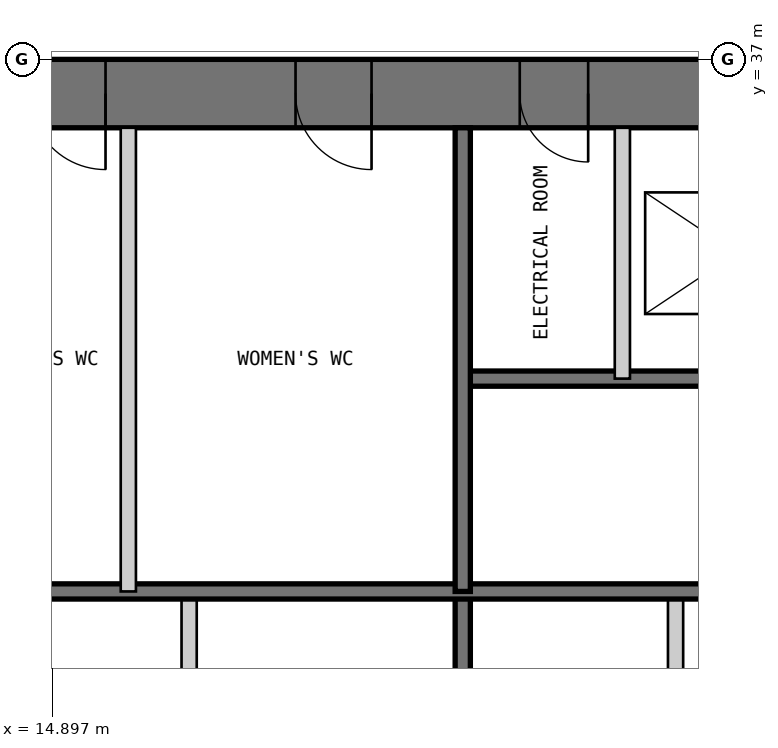
"""IFC4 building model, lengths in metres.
Left out: names, types, materials, properties, quantities, classifications, styles, units other than length and angle.
Written with IfcOpenShell. Run it as: python <this file> out.ifc"""

import sys

from ifc_helpers import new_model, si_unit, direction, frame, frame_2d, origin, place, context, subcontext, project, spatial, polyline, rectangle, outline, extrude, element, fill, save


model = new_model("IFC4")
c1 = context("Model", 3, precision=1e-05, world=origin(), true_north=direction((0.0, 1.0)))
c2 = subcontext(c1, "Body", "Model", "MODEL_VIEW")
j1 = project(units=[si_unit("LENGTHUNIT", "METRE"), si_unit("PLANEANGLEUNIT", "RADIAN")], contexts=[c1])
p1 = place(None, origin())
s1 = spatial("IfcSite", under=j1, at=p1, CompositionType="ELEMENT")
p2 = place(p1, origin())
s2 = spatial("IfcBuilding", under=s1, at=p2, CompositionType="ELEMENT")
p3 = place(p2, frame((0.0, 0.0, 259.4)))
s3 = spatial("IfcBuildingStorey", under=s2, at=p3, CompositionType="ELEMENT", Elevation=259.4)
p4 = place(p3, frame((37.0, 36.55, 0.0), z_axis=(0.0, 0.0, 1.0), x_axis=(-1.0, 0.0, 0.0)))
e1 = element("IfcWall", 1, at=p4, inside=s3, PredefinedType="SHEAR", context=c2, shape_type="SweptSolid", body=[
    extrude(outline(polyline([(0.0, -0.45), (24.0, -0.45), (23.1, 0.45), (0.9, 0.45), (0.0, -0.45)])), origin(), (0.0, 0.0, 1.0), 3.4),
])
p5 = place(p4, frame((4.9, 0.0, 0.0)))
e2 = element("IfcOpeningElement", 2, at=p5, cuts=e1, PredefinedType="OPENING", context=c2, shape_type="SweptSolid", body=[
    extrude(rectangle(XDim=1.0, YDim=2.2, at=frame_2d((0.5, 1.1))), frame((0.0, 0.46, 0.0), z_axis=(0.0, -1.0, 0.0), x_axis=(1.0, 0.0, 0.0)), (0.0, 0.0, 1.0), 0.92),
])
p6 = place(p4, frame((8.9, 0.0, 0.0)))
e3 = element("IfcOpeningElement", 3, at=p6, cuts=e1, PredefinedType="OPENING", context=c2, shape_type="SweptSolid", body=[
    extrude(rectangle(XDim=1.1, YDim=2.2, at=frame_2d((0.55, 1.1))), frame((0.0, 0.46, 0.0), z_axis=(0.0, -1.0, 0.0), x_axis=(1.0, 0.0, 0.0)), (0.0, 0.0, 1.0), 0.92),
])
p7 = place(p4, frame((15.05, 0.0, 0.0)))
e4 = element("IfcOpeningElement", 4, at=p7, cuts=e1, PredefinedType="OPENING", context=c2, shape_type="SweptSolid", body=[
    extrude(rectangle(XDim=0.9, YDim=2.2, at=frame_2d((0.45, 1.1))), frame((0.0, 0.46, 0.0), z_axis=(0.0, -1.0, 0.0), x_axis=(1.0, 0.0, 0.0)), (0.0, 0.0, 1.0), 0.92),
])
p8 = place(p4, frame((17.9, 0.0, 0.0)))
e5 = element("IfcOpeningElement", 5, at=p8, cuts=e1, PredefinedType="OPENING", context=c2, shape_type="SweptSolid", body=[
    extrude(rectangle(XDim=1.0, YDim=2.2, at=frame_2d((0.5, 1.1))), frame((0.0, 0.46, 0.0), z_axis=(0.0, -1.0, 0.0), x_axis=(1.0, 0.0, 0.0)), (0.0, 0.0, 1.0), 0.92),
])
p9 = place(p4, frame((21.4, 0.0, 0.0)))
e6 = element("IfcOpeningElement", 6, at=p9, cuts=e1, PredefinedType="OPENING", context=c2, shape_type="SweptSolid", body=[
    extrude(rectangle(XDim=1.0, YDim=2.2, at=frame_2d((0.5, 1.1))), frame((0.0, 0.46, 0.0), z_axis=(0.0, -1.0, 0.0), x_axis=(1.0, 0.0, 0.0)), (0.0, 0.0, 1.0), 0.92),
])
p10 = place(p3, frame((16.7, 13.9, 0.0), z_axis=(0.0, 0.0, 1.0), x_axis=(0.0, 1.0, 0.0)))
e7 = element("IfcWall", 7, at=p10, inside=s3, PredefinedType="PARTITIONING", context=c2, shape_type="SweptSolid", body=[
    extrude(rectangle(XDim=16.1, YDim=0.2, at=frame_2d((8.05, 0.0))), origin(), (0.0, 0.0, 1.0), 3.2),
])
p11 = place(p10, frame((6.15, 0.0, 0.0)))
e8 = element("IfcOpeningElement", 8, at=p11, cuts=e7, PredefinedType="OPENING", context=c2, shape_type="SweptSolid", body=[
    extrude(rectangle(XDim=0.9, YDim=2.2, at=frame_2d((0.45, 1.1))), frame((0.0, 0.11, 0.0), z_axis=(0.0, -1.0, 0.0), x_axis=(1.0, 0.0, 0.0)), (0.0, 0.0, 1.0), 0.22),
])
p12 = place(p10, frame((8.65, 0.0, 0.0)))
e9 = element("IfcOpeningElement", 9, at=p12, cuts=e7, PredefinedType="OPENING", context=c2, shape_type="SweptSolid", body=[
    extrude(rectangle(XDim=0.9, YDim=2.2, at=frame_2d((0.45, 1.1))), frame((0.0, 0.11, 0.0), z_axis=(0.0, -1.0, 0.0), x_axis=(1.0, 0.0, 0.0)), (0.0, 0.0, 1.0), 0.22),
])
p13 = place(p10, frame((12.8, 0.0, 0.0)))
e10 = element("IfcOpeningElement", 10, at=p13, cuts=e7, PredefinedType="OPENING", context=c2, shape_type="SweptSolid", body=[
    extrude(rectangle(XDim=0.9, YDim=2.2, at=frame_2d((0.45, 1.1))), frame((0.0, 0.11, 0.0), z_axis=(0.0, -1.0, 0.0), x_axis=(1.0, 0.0, 0.0)), (0.0, 0.0, 1.0), 0.22),
])
p14 = place(p3, frame((20.3, 13.9, 0.0), z_axis=(0.0, 0.0, 1.0), x_axis=(0.0, 1.0, 0.0)))
e11 = element("IfcWall", 11, at=p14, inside=s3, PredefinedType="SOLIDWALL", context=c2, shape_type="SweptSolid", body=[
    extrude(rectangle(XDim=16.1, YDim=0.2, at=frame_2d((8.05, 0.0))), origin(), (0.0, 0.0, 1.0), 3.2),
])
p15 = place(p14, frame((7.9, 0.0, 0.0)))
e12 = element("IfcOpeningElement", 12, at=p15, cuts=e11, PredefinedType="OPENING", context=c2, shape_type="SweptSolid", body=[
    extrude(rectangle(XDim=0.9, YDim=2.2, at=frame_2d((0.45, 1.1))), frame((0.0, 0.11, 0.0), z_axis=(0.0, -1.0, 0.0), x_axis=(1.0, 0.0, 0.0)), (0.0, 0.0, 1.0), 0.22),
])
p16 = place(p14, frame((12.9, 0.0, 0.0)))
e13 = element("IfcOpeningElement", 13, at=p16, cuts=e11, PredefinedType="OPENING", context=c2, shape_type="SweptSolid", body=[
    extrude(rectangle(XDim=0.9, YDim=2.2, at=frame_2d((0.45, 1.1))), frame((0.0, 0.11, 0.0), z_axis=(0.0, -1.0, 0.0), x_axis=(1.0, 0.0, 0.0)), (0.0, 0.0, 1.0), 0.22),
])
p17 = place(p3, frame((23.1, 20.0, 0.0), z_axis=(0.0, 0.0, 1.0), x_axis=(0.0, 1.0, 0.0)))
e14 = element("IfcWall", 14, at=p17, inside=s3, PredefinedType="PARTITIONING", context=c2, shape_type="SweptSolid", body=[
    extrude(rectangle(XDim=10.0, YDim=0.2, at=frame_2d((5.0, 0.0))), origin(), (0.0, 0.0, 1.0), 3.2),
])
p18 = place(p3, frame((29.7, 32.8, 0.0), z_axis=(0.0, 0.0, 1.0), x_axis=(-1.0, 0.0, 0.0)))
e15 = element("IfcWall", 15, at=p18, inside=s3, PredefinedType="SOLIDWALL", context=c2, shape_type="SweptSolid", body=[
    extrude(rectangle(XDim=9.4, YDim=0.2, at=frame_2d((4.7, 0.0))), origin(), (0.0, 0.0, 1.0), 3.2),
])
p19 = place(p18, frame((0.25, 0.0, 0.0)))
e16 = element("IfcOpeningElement", 16, at=p19, cuts=e15, PredefinedType="OPENING", context=c2, shape_type="SweptSolid", body=[
    extrude(rectangle(XDim=1.0, YDim=2.2, at=frame_2d((0.5, 1.1))), frame((0.0, 0.11, 0.0), z_axis=(0.0, -1.0, 0.0), x_axis=(1.0, 0.0, 0.0)), (0.0, 0.0, 1.0), 0.22),
])
p20 = place(p3, frame((29.7, 30.0, 0.0), z_axis=(0.0, 0.0, 1.0), x_axis=(-1.0, 0.0, 0.0)))
e17 = element("IfcWall", 17, at=p20, inside=s3, PredefinedType="SOLIDWALL", context=c2, shape_type="SweptSolid", body=[
    extrude(rectangle(XDim=15.8, YDim=0.2, at=frame_2d((7.9, 0.0))), origin(), (0.0, 0.0, 1.0), 3.2),
])
p21 = place(p3, frame((22.4, 36.1, 0.0), z_axis=(0.0, 0.0, 1.0), x_axis=(0.0, -1.0, 0.0)))
e18 = element("IfcWall", 18, at=p21, inside=s3, PredefinedType="PARTITIONING", context=c2, shape_type="SweptSolid", body=[
    extrude(rectangle(XDim=3.3, YDim=0.2, at=frame_2d((1.65, 0.0))), origin(), (0.0, 0.0, 1.0), 3.2),
])
p22 = place(p3, frame((20.3, 36.1, 0.0), z_axis=(0.0, 0.0, 1.0), x_axis=(0.0, -1.0, 0.0)))
e19 = element("IfcWall", 19, at=p22, inside=s3, PredefinedType="SOLIDWALL", context=c2, shape_type="SweptSolid", body=[
    extrude(rectangle(XDim=6.1, YDim=0.2, at=frame_2d((3.05, 0.0))), origin(), (0.0, 0.0, 1.0), 3.2),
])
p23 = place(p3, frame((15.9, 36.1, 0.0), z_axis=(0.0, 0.0, 1.0), x_axis=(0.0, -1.0, 0.0)))
e20 = element("IfcWall", 20, at=p23, inside=s3, PredefinedType="PARTITIONING", context=c2, shape_type="SweptSolid", body=[
    extrude(rectangle(XDim=6.1, YDim=0.2, at=frame_2d((3.05, 0.0))), origin(), (0.0, 0.0, 1.0), 3.2),
])
p24 = place(p7, origin())
e21 = element("IfcDoor", 21, at=p24, inside=s3, OperationType="SINGLE_SWING_LEFT", PredefinedType="DOOR", context=c2, shape_type="SweptSolid", body=[
    extrude(rectangle(XDim=0.9, YDim=2.2, at=frame_2d((0.45, 1.1))), frame((0.0, 0.025, 0.0), z_axis=(0.0, -1.0, 0.0), x_axis=(1.0, 0.0, 0.0)), (0.0, 0.0, 1.0), 0.05),
    extrude(outline(polyline([(0.0, 0.0), (0.04, 0.0), (0.04, 2.16), (0.86, 2.16), (0.86, 0.0), (0.9, 0.0), (0.9, 2.2), (0.0, 2.2), (0.0, 0.0)])), frame((0.0, 0.3, 0.0), z_axis=(0.0, -1.0, 0.0), x_axis=(1.0, 0.0, 0.0)), (0.0, 0.0, 1.0), 0.6),
])
fill(e4, e21)
p25 = place(p8, origin())
e22 = element("IfcDoor", 22, at=p25, inside=s3, OperationType="SINGLE_SWING_LEFT", PredefinedType="DOOR", context=c2, shape_type="SweptSolid", body=[
    extrude(rectangle(XDim=1.0, YDim=2.2, at=frame_2d((0.5, 1.1))), frame((0.0, 0.025, 0.0), z_axis=(0.0, -1.0, 0.0), x_axis=(1.0, 0.0, 0.0)), (0.0, 0.0, 1.0), 0.05),
    extrude(outline(polyline([(0.0, 0.0), (0.04, 0.0), (0.04, 2.16), (0.96, 2.16), (0.96, 0.0), (1.0, 0.0), (1.0, 2.2), (0.0, 2.2), (0.0, 0.0)])), frame((0.0, 0.3, 0.0), z_axis=(0.0, -1.0, 0.0), x_axis=(1.0, 0.0, 0.0)), (0.0, 0.0, 1.0), 0.6),
])
fill(e5, e22)
p26 = place(p9, origin())
e23 = element("IfcDoor", 23, at=p26, inside=s3, OperationType="SINGLE_SWING_LEFT", PredefinedType="DOOR", context=c2, shape_type="SweptSolid", body=[
    extrude(rectangle(XDim=1.0, YDim=2.2, at=frame_2d((0.5, 1.1))), frame((0.0, 0.025, 0.0), z_axis=(0.0, -1.0, 0.0), x_axis=(1.0, 0.0, 0.0)), (0.0, 0.0, 1.0), 0.05),
    extrude(outline(polyline([(0.0, 0.0), (0.04, 0.0), (0.04, 2.16), (0.96, 2.16), (0.96, 0.0), (1.0, 0.0), (1.0, 2.2), (0.0, 2.2), (0.0, 0.0)])), frame((0.0, 0.3, 0.0), z_axis=(0.0, -1.0, 0.0), x_axis=(1.0, 0.0, 0.0)), (0.0, 0.0, 1.0), 0.6),
])
fill(e6, e23)
save(model, sys.argv[1])
